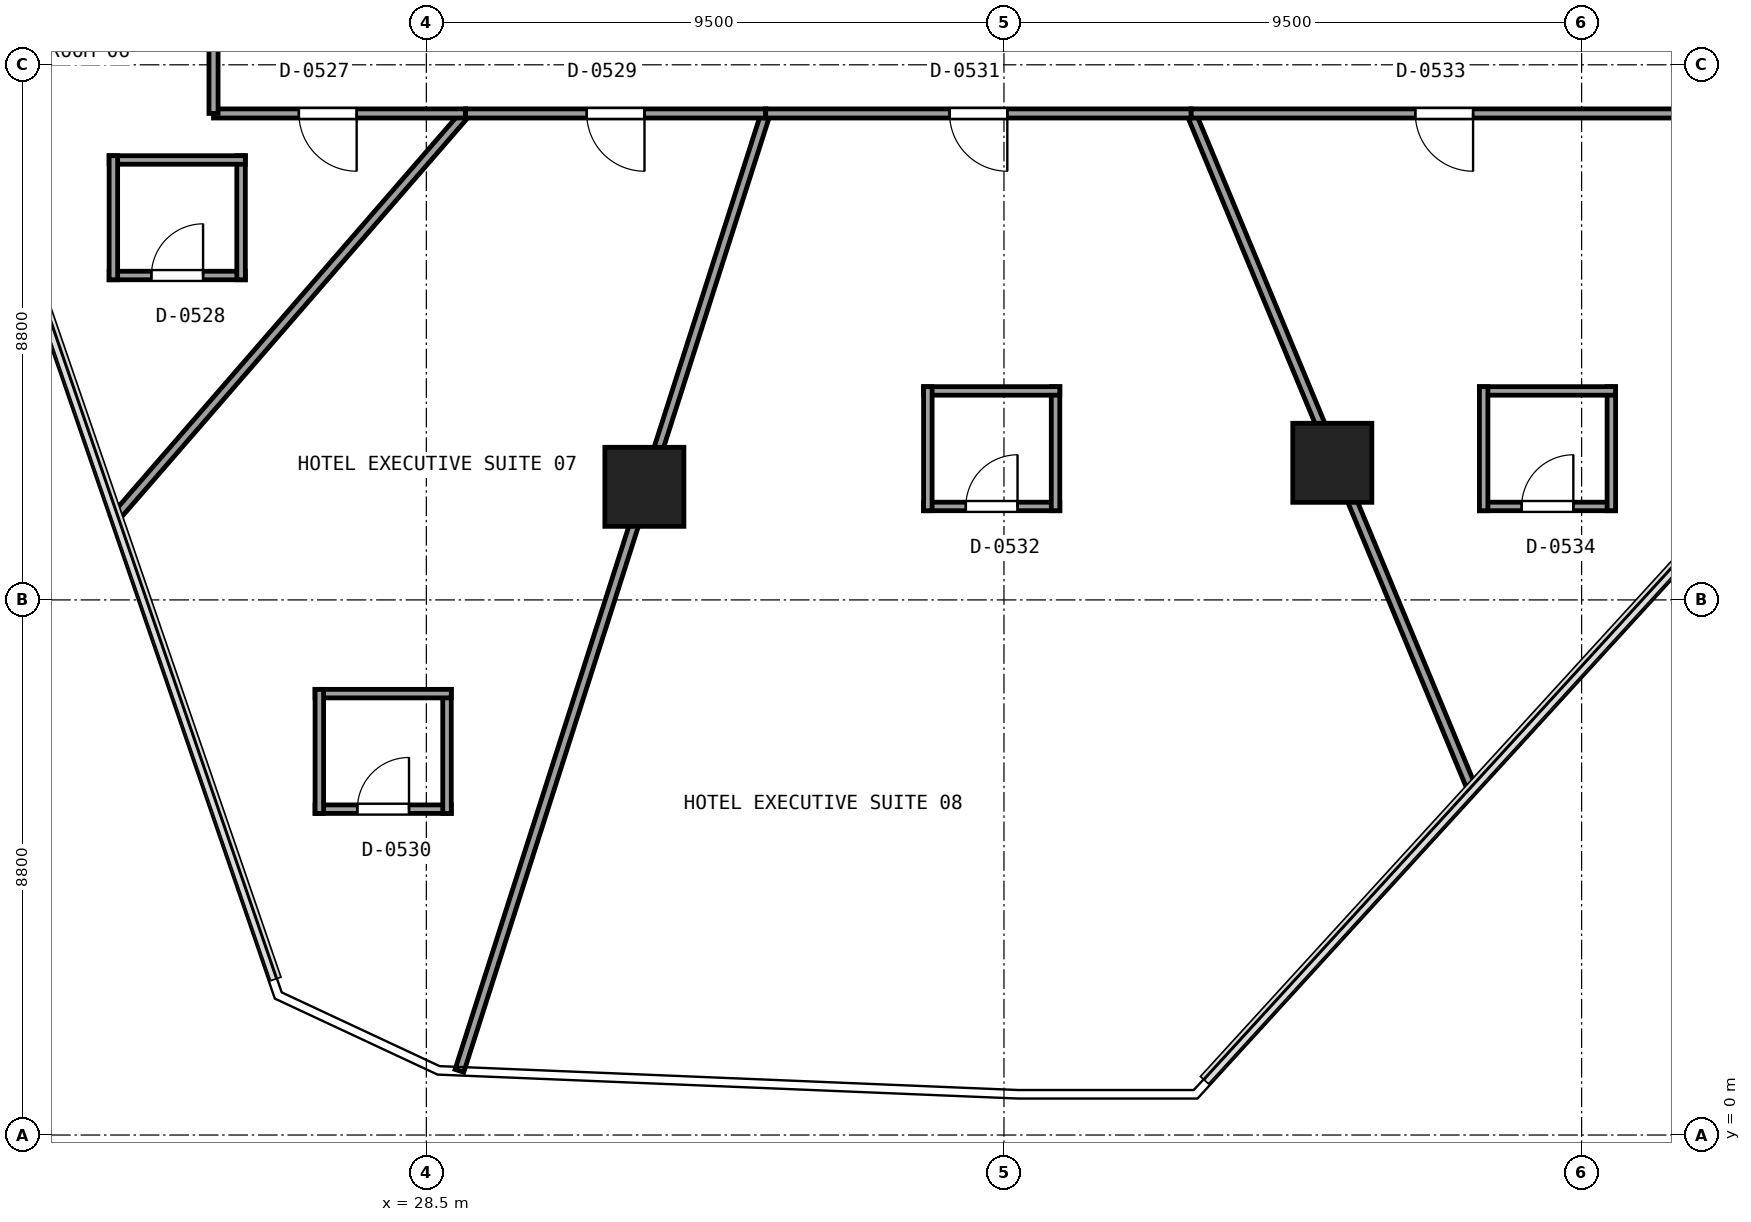
"""IFC4 building model, lengths in metres.
Left out: names, types, materials, properties, quantities, classifications, styles, units other than length and angle.
Written with IfcOpenShell. Run it as: python <this file> out.ifc"""

import sys

from ifc_helpers import new_model, si_unit, direction, frame, frame_2d, origin, origin_2d, place, context, subcontext, project, spatial, rectangle, extrude, element, fill, save


model = new_model("IFC4")
c1 = context("Model", 3, precision=1e-05, world=origin(), true_north=direction((0.0, 1.0)))
c2 = subcontext(c1, "Body", "Model", "MODEL_VIEW")
j1 = project(units=[si_unit("LENGTHUNIT", "METRE"), si_unit("PLANEANGLEUNIT", "RADIAN")], contexts=[c1])
p1 = place(None, origin())
s1 = spatial("IfcSite", under=j1, at=p1, CompositionType="ELEMENT")
p2 = place(p1, origin())
s2 = spatial("IfcBuilding", under=s1, at=p2, CompositionType="ELEMENT")
p3 = place(p2, frame((0.0, 0.0, 27.0)))
s3 = spatial("IfcBuildingStorey", under=s2, at=p3, CompositionType="ELEMENT", Elevation=27.0)
for number, where, z_axis, x_axis in (
    (1, (32.086, 10.66, -0.405), (0.0, 0.0, 1.0), (1.0, 0.0, 0.0)),
    (2, (43.4, 11.055, -0.405), (0.0, 0.0, 1.0), (1.0, 0.0, 0.0)),
):
    element("IfcColumn", number, at=place(p3, frame(where, z_axis=z_axis, x_axis=x_axis)), inside=s3, PredefinedType="COLUMN", context=c2, shape_type="SweptSolid", body=[
        extrude(rectangle(XDim=1.3, YDim=1.3, at=origin_2d()), origin(), (0.0, 0.0, 1.0), 3.575),
    ])
p4 = place(p3, frame((23.283, 14.135, 0.0), z_axis=(0.0, 0.0, 1.0), x_axis=(1.0, 0.0, 0.0)))
e3 = element("IfcWall", 3, at=p4, inside=s3, PredefinedType="PARTITIONING", context=c2, shape_type="SweptSolid", body=[
    extrude(rectangle(XDim=2.24, YDim=0.14, at=frame_2d((1.12, 0.0))), origin(), (0.0, 0.0, 1.0), 3.17),
])
p5 = place(p4, frame((0.695, 0.0, 0.0)))
e4 = element("IfcOpeningElement", 4, at=p5, cuts=e3, PredefinedType="OPENING", context=c2, shape_type="SweptSolid", body=[
    extrude(rectangle(XDim=0.85, YDim=2.1, at=frame_2d((0.425, 1.05))), frame((0.0, 0.08, 0.0), z_axis=(0.0, -1.0, 0.0), x_axis=(1.0, 0.0, 0.0)), (0.0, 0.0, 1.0), 0.16),
])
p6 = place(p3, frame((25.453, 14.065, 0.0), z_axis=(0.0, 0.0, 1.0), x_axis=(0.0, 1.0, 0.0)))
e5 = element("IfcWall", 5, at=p6, inside=s3, PredefinedType="PARTITIONING", context=c2, shape_type="SweptSolid", body=[
    extrude(rectangle(XDim=2.04, YDim=0.14, at=frame_2d((1.02, 0.0))), origin(), (0.0, 0.0, 1.0), 3.17),
])
p7 = place(p3, frame((25.523, 16.035, 0.0), z_axis=(0.0, 0.0, 1.0), x_axis=(-1.0, 0.0, 0.0)))
e6 = element("IfcWall", 6, at=p7, inside=s3, PredefinedType="PARTITIONING", context=c2, shape_type="SweptSolid", body=[
    extrude(rectangle(XDim=2.24, YDim=0.14, at=frame_2d((1.12, 0.0))), origin(), (0.0, 0.0, 1.0), 3.17),
])
p8 = place(p3, frame((23.353, 16.105, 0.0), z_axis=(0.0, 0.0, 1.0), x_axis=(0.0, -1.0, 0.0)))
e7 = element("IfcWall", 7, at=p8, inside=s3, PredefinedType="PARTITIONING", context=c2, shape_type="SweptSolid", body=[
    extrude(rectangle(XDim=2.04, YDim=0.14, at=frame_2d((1.02, 0.0))), origin(), (0.0, 0.0, 1.0), 3.17),
])
p9 = place(p3, frame((26.67, 5.359, 0.0), z_axis=(0.0, 0.0, 1.0), x_axis=(1.0, 0.0, 0.0)))
e8 = element("IfcWall", 8, at=p9, inside=s3, PredefinedType="PARTITIONING", context=c2, shape_type="SweptSolid", body=[
    extrude(rectangle(XDim=2.24, YDim=0.14, at=frame_2d((1.12, 0.0))), origin(), (0.0, 0.0, 1.0), 3.17),
])
p10 = place(p9, frame((0.695, 0.0, 0.0)))
e9 = element("IfcOpeningElement", 9, at=p10, cuts=e8, PredefinedType="OPENING", context=c2, shape_type="SweptSolid", body=[
    extrude(rectangle(XDim=0.85, YDim=2.1, at=frame_2d((0.425, 1.05))), frame((0.0, 0.08, 0.0), z_axis=(0.0, -1.0, 0.0), x_axis=(1.0, 0.0, 0.0)), (0.0, 0.0, 1.0), 0.16),
])
p11 = place(p3, frame((28.84, 5.289, 0.0), z_axis=(0.0, 0.0, 1.0), x_axis=(0.0, 1.0, 0.0)))
e10 = element("IfcWall", 10, at=p11, inside=s3, PredefinedType="PARTITIONING", context=c2, shape_type="SweptSolid", body=[
    extrude(rectangle(XDim=2.04, YDim=0.14, at=frame_2d((1.02, 0.0))), origin(), (0.0, 0.0, 1.0), 3.17),
])
p12 = place(p3, frame((28.91, 7.259, 0.0), z_axis=(0.0, 0.0, 1.0), x_axis=(-1.0, 0.0, 0.0)))
e11 = element("IfcWall", 11, at=p12, inside=s3, PredefinedType="PARTITIONING", context=c2, shape_type="SweptSolid", body=[
    extrude(rectangle(XDim=2.24, YDim=0.14, at=frame_2d((1.12, 0.0))), origin(), (0.0, 0.0, 1.0), 3.17),
])
p13 = place(p3, frame((26.74, 7.329, 0.0), z_axis=(0.0, 0.0, 1.0), x_axis=(0.0, -1.0, 0.0)))
e12 = element("IfcWall", 12, at=p13, inside=s3, PredefinedType="PARTITIONING", context=c2, shape_type="SweptSolid", body=[
    extrude(rectangle(XDim=2.04, YDim=0.14, at=frame_2d((1.02, 0.0))), origin(), (0.0, 0.0, 1.0), 3.17),
])
p14 = place(p3, frame((36.678, 10.337, 0.0), z_axis=(0.0, 0.0, 1.0), x_axis=(1.0, 0.0, 0.0)))
e13 = element("IfcWall", 13, at=p14, inside=s3, PredefinedType="PARTITIONING", context=c2, shape_type="SweptSolid", body=[
    extrude(rectangle(XDim=2.24, YDim=0.14, at=frame_2d((1.12, 0.0))), origin(), (0.0, 0.0, 1.0), 3.17),
])
p15 = place(p14, frame((0.695, 0.0, 0.0)))
e14 = element("IfcOpeningElement", 14, at=p15, cuts=e13, PredefinedType="OPENING", context=c2, shape_type="SweptSolid", body=[
    extrude(rectangle(XDim=0.85, YDim=2.1, at=frame_2d((0.425, 1.05))), frame((0.0, 0.08, 0.0), z_axis=(0.0, -1.0, 0.0), x_axis=(1.0, 0.0, 0.0)), (0.0, 0.0, 1.0), 0.16),
])
p16 = place(p3, frame((38.848, 10.267, 0.0), z_axis=(0.0, 0.0, 1.0), x_axis=(0.0, 1.0, 0.0)))
e15 = element("IfcWall", 15, at=p16, inside=s3, PredefinedType="PARTITIONING", context=c2, shape_type="SweptSolid", body=[
    extrude(rectangle(XDim=2.04, YDim=0.14, at=frame_2d((1.02, 0.0))), origin(), (0.0, 0.0, 1.0), 2.355),
])
p17 = place(p3, frame((38.918, 12.237, 0.0), z_axis=(0.0, 0.0, 1.0), x_axis=(-1.0, 0.0, 0.0)))
e16 = element("IfcWall", 16, at=p17, inside=s3, PredefinedType="PARTITIONING", context=c2, shape_type="SweptSolid", body=[
    extrude(rectangle(XDim=2.24, YDim=0.14, at=frame_2d((1.12, 0.0))), origin(), (0.0, 0.0, 1.0), 3.17),
])
p18 = place(p3, frame((36.748, 12.307, 0.0), z_axis=(0.0, 0.0, 1.0), x_axis=(0.0, -1.0, 0.0)))
e17 = element("IfcWall", 17, at=p18, inside=s3, PredefinedType="PARTITIONING", context=c2, shape_type="SweptSolid", body=[
    extrude(rectangle(XDim=2.04, YDim=0.14, at=frame_2d((1.02, 0.0))), origin(), (0.0, 0.0, 1.0), 2.355),
])
p19 = place(p3, frame((45.819, 10.337, 0.0), z_axis=(0.0, 0.0, 1.0), x_axis=(1.0, 0.0, 0.0)))
e18 = element("IfcWall", 18, at=p19, inside=s3, PredefinedType="PARTITIONING", context=c2, shape_type="SweptSolid", body=[
    extrude(rectangle(XDim=2.24, YDim=0.14, at=frame_2d((1.12, 0.0))), origin(), (0.0, 0.0, 1.0), 3.17),
])
p20 = place(p19, frame((0.695, 0.0, 0.0)))
e19 = element("IfcOpeningElement", 19, at=p20, cuts=e18, PredefinedType="OPENING", context=c2, shape_type="SweptSolid", body=[
    extrude(rectangle(XDim=0.85, YDim=2.1, at=frame_2d((0.425, 1.05))), frame((0.0, 0.08, 0.0), z_axis=(0.0, -1.0, 0.0), x_axis=(1.0, 0.0, 0.0)), (0.0, 0.0, 1.0), 0.16),
])
p21 = place(p3, frame((47.989, 10.267, 0.0), z_axis=(0.0, 0.0, 1.0), x_axis=(0.0, 1.0, 0.0)))
e20 = element("IfcWall", 20, at=p21, inside=s3, PredefinedType="PARTITIONING", context=c2, shape_type="SweptSolid", body=[
    extrude(rectangle(XDim=2.04, YDim=0.14, at=frame_2d((1.02, 0.0))), origin(), (0.0, 0.0, 1.0), 3.17),
])
p22 = place(p3, frame((48.059, 12.237, 0.0), z_axis=(0.0, 0.0, 1.0), x_axis=(-1.0, 0.0, 0.0)))
e21 = element("IfcWall", 21, at=p22, inside=s3, PredefinedType="PARTITIONING", context=c2, shape_type="SweptSolid", body=[
    extrude(rectangle(XDim=2.24, YDim=0.14, at=frame_2d((1.12, 0.0))), origin(), (0.0, 0.0, 1.0), 3.17),
])
p23 = place(p3, frame((45.889, 12.307, 0.0), z_axis=(0.0, 0.0, 1.0), x_axis=(0.0, -1.0, 0.0)))
e22 = element("IfcWall", 22, at=p23, inside=s3, PredefinedType="PARTITIONING", context=c2, shape_type="SweptSolid", body=[
    extrude(rectangle(XDim=2.04, YDim=0.14, at=frame_2d((1.02, 0.0))), origin(), (0.0, 0.0, 1.0), 3.17),
])
p24 = place(p3, frame((23.368, 10.14, 0.0), z_axis=(0.0, 0.0, 1.0), x_axis=(0.655252017972, 0.75541034739, 0.0)))
e23 = element("IfcWall", 23, at=p24, inside=s3, PredefinedType="PARTITIONING", context=c2, shape_type="SweptSolid", body=[
    extrude(rectangle(XDim=8.817, YDim=0.15, at=frame_2d((4.408, 0.0))), origin(), (0.0, 0.0, 1.0), 2.355),
])
p25 = place(p3, frame((29.145, 16.8, 0.0), z_axis=(0.0, 0.0, 1.0), x_axis=(-1.0, 0.0, 0.0)))
e24 = element("IfcWall", 24, at=p25, inside=s3, PredefinedType="PARTITIONING", context=c2, shape_type="SweptSolid", body=[
    extrude(rectangle(XDim=4.145, YDim=0.15, at=frame_2d((2.073, 0.0))), origin(), (0.0, 0.0, 1.0), 2.355),
])
p26 = place(p25, frame((1.791, 0.0, 0.0)))
e25 = element("IfcOpeningElement", 25, at=p26, cuts=e24, PredefinedType="OPENING", context=c2, shape_type="SweptSolid", body=[
    extrude(rectangle(XDim=0.95, YDim=2.15, at=frame_2d((0.475, 1.075))), frame((0.0, 0.085, 0.0), z_axis=(0.0, -1.0, 0.0), x_axis=(1.0, 0.0, 0.0)), (0.0, 0.0, 1.0), 0.17),
])
p27 = place(p3, frame((25.0, 16.8, 0.0), z_axis=(0.0, 0.0, 1.0), x_axis=(0.0, 1.0, 0.0)))
e26 = element("IfcWall", 26, at=p27, inside=s3, PredefinedType="PARTITIONING", context=c2, shape_type="SweptSolid", body=[
    extrude(rectangle(XDim=1.8, YDim=0.15, at=frame_2d((0.9, 0.0))), origin(), (0.0, 0.0, 1.0), 2.355),
])
p28 = place(p3, frame((29.044, 1.056, 0.0), z_axis=(0.0, 0.0, 1.0), x_axis=(0.304719993412, 0.952441980183, 0.0)))
e27 = element("IfcWall", 27, at=p28, inside=s3, PredefinedType="PARTITIONING", context=c2, shape_type="SweptSolid", body=[
    extrude(rectangle(XDim=16.53, YDim=0.15, at=frame_2d((8.265, 0.0))), origin(), (0.0, 0.0, 1.0), 2.395),
])
p29 = place(p3, frame((34.081, 16.8, 0.0), z_axis=(0.0, 0.0, 1.0), x_axis=(-1.0, 0.0, 0.0)))
e28 = element("IfcWall", 28, at=p29, inside=s3, PredefinedType="PARTITIONING", context=c2, shape_type="SweptSolid", body=[
    extrude(rectangle(XDim=4.936, YDim=0.15, at=frame_2d((2.468, 0.0))), origin(), (0.0, 0.0, 1.0), 2.395),
])
p30 = place(p29, frame((1.993, 0.0, 0.0)))
e29 = element("IfcOpeningElement", 29, at=p30, cuts=e28, PredefinedType="OPENING", context=c2, shape_type="SweptSolid", body=[
    extrude(rectangle(XDim=0.95, YDim=2.15, at=frame_2d((0.475, 1.075))), frame((0.0, 0.085, 0.0), z_axis=(0.0, -1.0, 0.0), x_axis=(1.0, 0.0, 0.0)), (0.0, 0.0, 1.0), 0.17),
])
p31 = place(p3, frame((45.709, 5.659, 0.0), z_axis=(0.0, 0.0, 1.0), x_axis=(-0.383750228446, 0.923436929177, 0.0)))
e30 = element("IfcWall", 30, at=p31, inside=s3, PredefinedType="PARTITIONING", context=c2, shape_type="SweptSolid", body=[
    extrude(rectangle(XDim=12.065, YDim=0.15, at=frame_2d((6.032, 0.0))), origin(), (0.0, 0.0, 1.0), 2.395),
])
p32 = place(p3, frame((41.079, 16.8, 0.0), z_axis=(0.0, 0.0, 1.0), x_axis=(-1.0, 0.0, 0.0)))
e31 = element("IfcWall", 31, at=p32, inside=s3, PredefinedType="PARTITIONING", context=c2, shape_type="SweptSolid", body=[
    extrude(rectangle(XDim=6.998, YDim=0.15, at=frame_2d((3.499, 0.0))), origin(), (0.0, 0.0, 1.0), 2.395),
])
p33 = place(p32, frame((3.024, 0.0, 0.0)))
e32 = element("IfcOpeningElement", 32, at=p33, cuts=e31, PredefinedType="OPENING", context=c2, shape_type="SweptSolid", body=[
    extrude(rectangle(XDim=0.95, YDim=2.15, at=frame_2d((0.475, 1.075))), frame((0.0, 0.085, 0.0), z_axis=(0.0, -1.0, 0.0), x_axis=(1.0, 0.0, 0.0)), (0.0, 0.0, 1.0), 0.17),
])
p34 = place(p3, frame((49.4, 16.8, 0.0), z_axis=(0.0, 0.0, 1.0), x_axis=(-1.0, 0.0, 0.0)))
e33 = element("IfcWall", 33, at=p34, inside=s3, PredefinedType="PARTITIONING", context=c2, shape_type="SweptSolid", body=[
    extrude(rectangle(XDim=8.321, YDim=0.15, at=frame_2d((4.16, 0.0))), origin(), (0.0, 0.0, 1.0), 2.355),
])
p35 = place(p34, frame((3.685, 0.0, 0.0)))
e34 = element("IfcOpeningElement", 34, at=p35, cuts=e33, PredefinedType="OPENING", context=c2, shape_type="SweptSolid", body=[
    extrude(rectangle(XDim=0.95, YDim=2.15, at=frame_2d((0.475, 1.075))), frame((0.0, 0.085, 0.0), z_axis=(0.0, -1.0, 0.0), x_axis=(1.0, 0.0, 0.0)), (0.0, 0.0, 1.0), 0.17),
])
p36 = place(p26, origin())
e35 = element("IfcDoor", 35, at=p36, inside=s3, OperationType="SINGLE_SWING_LEFT", PredefinedType="DOOR", context=c2, shape_type="SweptSolid", body=[
    extrude(rectangle(XDim=0.95, YDim=2.15, at=frame_2d((0.475, 1.075))), frame((0.0, 0.025, 0.0), z_axis=(0.0, -1.0, 0.0), x_axis=(1.0, 0.0, 0.0)), (0.0, 0.0, 1.0), 0.05),
])
fill(e25, e35)
p37 = place(p5, origin())
e36 = element("IfcDoor", 36, at=p37, inside=s3, OperationType="SINGLE_SWING_RIGHT", PredefinedType="DOOR", context=c2, shape_type="SweptSolid", body=[
    extrude(rectangle(XDim=0.85, YDim=2.1, at=frame_2d((0.425, 1.05))), frame((0.0, 0.025, 0.0), z_axis=(0.0, -1.0, 0.0), x_axis=(1.0, 0.0, 0.0)), (0.0, 0.0, 1.0), 0.05),
])
fill(e4, e36)
p38 = place(p30, origin())
e37 = element("IfcDoor", 37, at=p38, inside=s3, OperationType="SINGLE_SWING_LEFT", PredefinedType="DOOR", context=c2, shape_type="SweptSolid", body=[
    extrude(rectangle(XDim=0.95, YDim=2.15, at=frame_2d((0.475, 1.075))), frame((0.0, 0.025, 0.0), z_axis=(0.0, -1.0, 0.0), x_axis=(1.0, 0.0, 0.0)), (0.0, 0.0, 1.0), 0.05),
])
fill(e29, e37)
p39 = place(p10, origin())
e38 = element("IfcDoor", 38, at=p39, inside=s3, OperationType="SINGLE_SWING_RIGHT", PredefinedType="DOOR", context=c2, shape_type="SweptSolid", body=[
    extrude(rectangle(XDim=0.85, YDim=2.1, at=frame_2d((0.425, 1.05))), frame((0.0, 0.025, 0.0), z_axis=(0.0, -1.0, 0.0), x_axis=(1.0, 0.0, 0.0)), (0.0, 0.0, 1.0), 0.05),
])
fill(e9, e38)
p40 = place(p33, origin())
e39 = element("IfcDoor", 39, at=p40, inside=s3, OperationType="SINGLE_SWING_LEFT", PredefinedType="DOOR", context=c2, shape_type="SweptSolid", body=[
    extrude(rectangle(XDim=0.95, YDim=2.15, at=frame_2d((0.475, 1.075))), frame((0.0, 0.025, 0.0), z_axis=(0.0, -1.0, 0.0), x_axis=(1.0, 0.0, 0.0)), (0.0, 0.0, 1.0), 0.05),
])
fill(e32, e39)
p41 = place(p15, origin())
e40 = element("IfcDoor", 40, at=p41, inside=s3, OperationType="SINGLE_SWING_RIGHT", PredefinedType="DOOR", context=c2, shape_type="SweptSolid", body=[
    extrude(rectangle(XDim=0.85, YDim=2.1, at=frame_2d((0.425, 1.05))), frame((0.0, 0.025, 0.0), z_axis=(0.0, -1.0, 0.0), x_axis=(1.0, 0.0, 0.0)), (0.0, 0.0, 1.0), 0.05),
])
fill(e14, e40)
p42 = place(p35, origin())
e41 = element("IfcDoor", 41, at=p42, inside=s3, OperationType="SINGLE_SWING_LEFT", PredefinedType="DOOR", context=c2, shape_type="SweptSolid", body=[
    extrude(rectangle(XDim=0.95, YDim=2.15, at=frame_2d((0.475, 1.075))), frame((0.0, 0.025, 0.0), z_axis=(0.0, -1.0, 0.0), x_axis=(1.0, 0.0, 0.0)), (0.0, 0.0, 1.0), 0.05),
])
fill(e34, e41)
p43 = place(p20, origin())
e42 = element("IfcDoor", 42, at=p43, inside=s3, OperationType="SINGLE_SWING_RIGHT", PredefinedType="DOOR", context=c2, shape_type="SweptSolid", body=[
    extrude(rectangle(XDim=0.85, YDim=2.1, at=frame_2d((0.425, 1.05))), frame((0.0, 0.025, 0.0), z_axis=(0.0, -1.0, 0.0), x_axis=(1.0, 0.0, 0.0)), (0.0, 0.0, 1.0), 0.05),
])
fill(e19, e42)
save(model, sys.argv[1])
